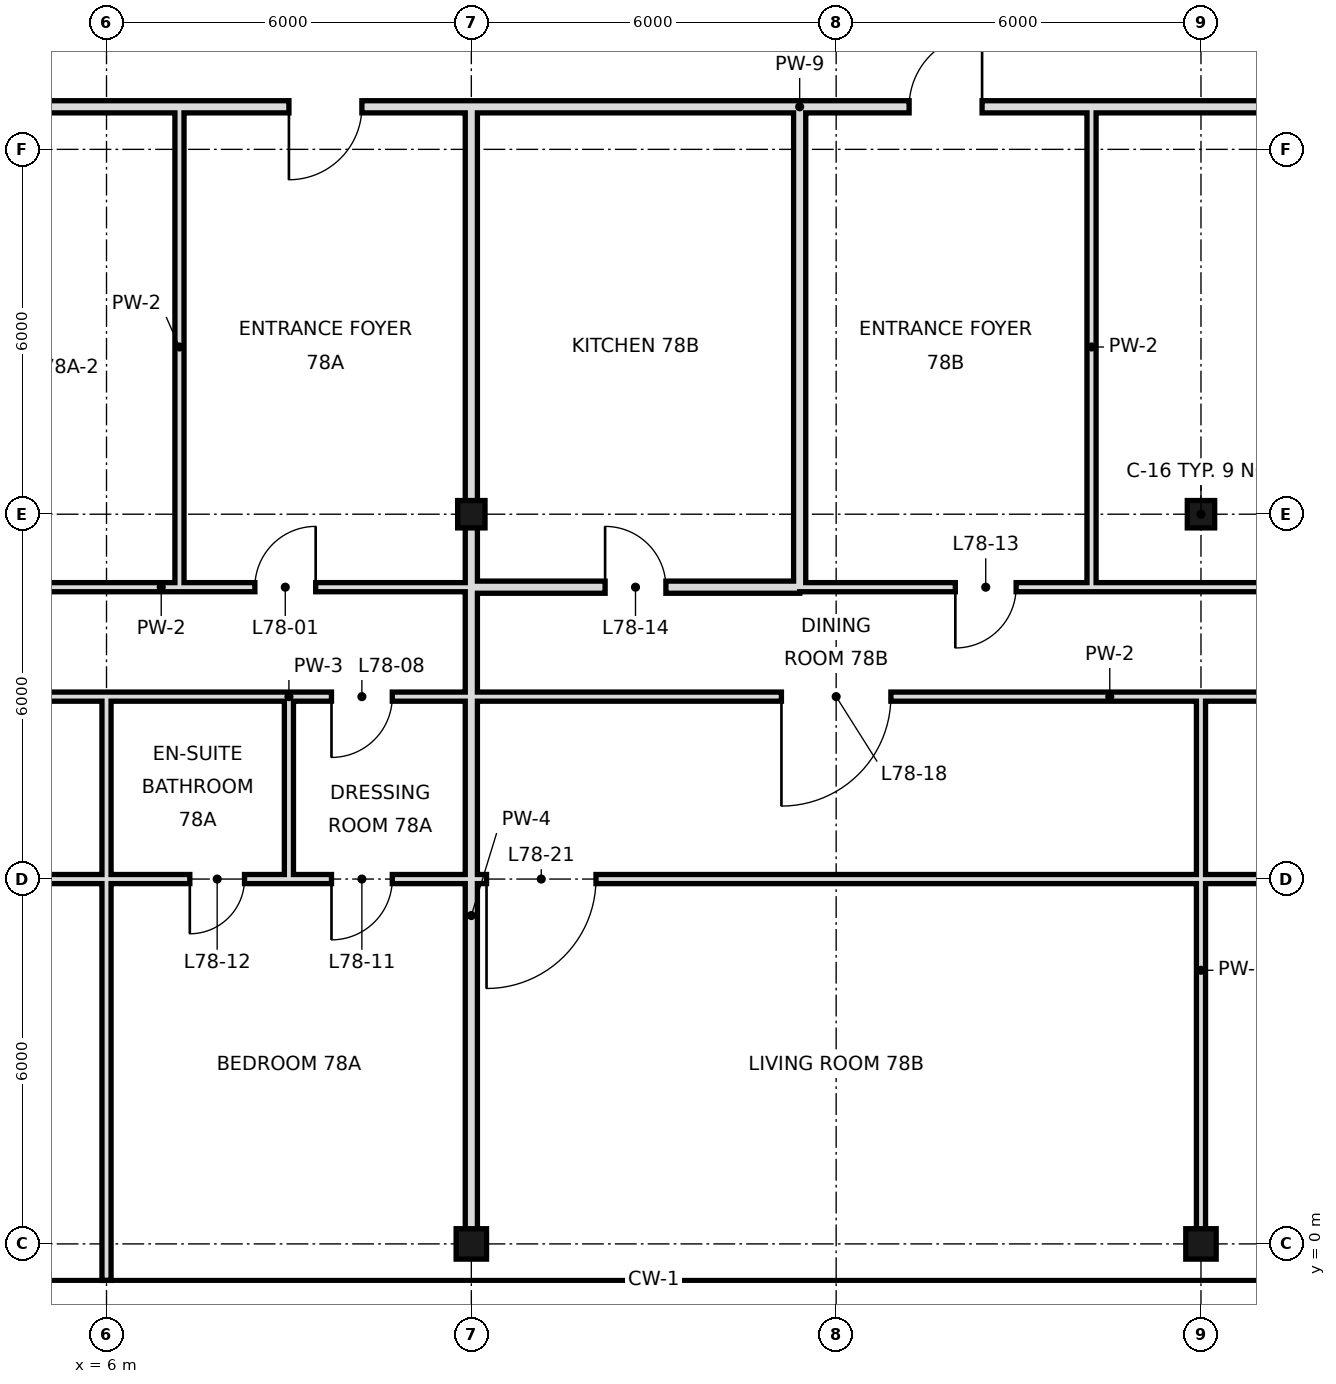
"""IFC4 building model, lengths in metres.
Left out: names, types, materials, properties, quantities, classifications, styles, units other than length and angle.
Written with IfcOpenShell. Run it as: python <this file> out.ifc"""

import sys

from ifc_helpers import new_model, si_unit, direction, frame, frame_2d, origin, origin_2d, place, context, subcontext, project, spatial, rectangle, hollow_rectangle, extrude, element, fill, save


model = new_model("IFC4")
c1 = context("Model", 3, precision=1e-05, world=origin(), true_north=direction((0.0, 1.0)))
c2 = subcontext(c1, "Body", "Model", "MODEL_VIEW")
j1 = project(units=[si_unit("LENGTHUNIT", "METRE"), si_unit("PLANEANGLEUNIT", "RADIAN")], contexts=[c1])
p1 = place(None, origin())
s1 = spatial("IfcSite", under=j1, at=p1, CompositionType="ELEMENT")
p2 = place(p1, origin())
s2 = spatial("IfcBuilding", under=s1, at=p2, CompositionType="ELEMENT")
p3 = place(p2, frame((0.0, 0.0, 326.8)))
s3 = spatial("IfcBuildingStorey", under=s2, at=p3, CompositionType="ELEMENT", Elevation=326.8)
p4 = place(p3, frame((12.0, 0.0, 0.0), z_axis=(0.0, 0.0, 1.0), x_axis=(1.0, 0.0, 0.0)))
e1 = element("IfcColumn", 1, at=p4, inside=s3, PredefinedType="COLUMN", context=c2, shape_type="SweptSolid", body=[
    extrude(hollow_rectangle(XDim=0.5, YDim=0.5, WallThickness=0.025, at=origin_2d()), origin(), (0.0, 0.0, 1.0), 4.4),
])
p5 = place(p3, frame((12.0, 12.0, 0.0), z_axis=(0.0, 0.0, 1.0), x_axis=(1.0, 0.0, 0.0)))
e2 = element("IfcColumn", 2, at=p5, inside=s3, PredefinedType="COLUMN", context=c2, shape_type="SweptSolid", body=[
    extrude(hollow_rectangle(XDim=0.45, YDim=0.45, WallThickness=0.022, at=origin_2d()), origin(), (0.0, 0.0, 1.0), 4.4),
])
p6 = place(p3, frame((24.0, 0.0, 0.0), z_axis=(0.0, 0.0, 1.0), x_axis=(1.0, 0.0, 0.0)))
e3 = element("IfcColumn", 3, at=p6, inside=s3, PredefinedType="COLUMN", context=c2, shape_type="SweptSolid", body=[
    extrude(hollow_rectangle(XDim=0.5, YDim=0.5, WallThickness=0.025, at=origin_2d()), origin(), (0.0, 0.0, 1.0), 4.4),
])
p7 = place(p3, frame((24.0, 12.0, 0.0), z_axis=(0.0, 0.0, 1.0), x_axis=(1.0, 0.0, 0.0)))
e4 = element("IfcColumn", 4, at=p7, inside=s3, PredefinedType="COLUMN", context=c2, shape_type="SweptSolid", body=[
    extrude(hollow_rectangle(XDim=0.45, YDim=0.45, WallThickness=0.022, at=origin_2d()), origin(), (0.0, 0.0, 1.0), 4.4),
])
p8 = place(p3, frame((12.0, 10.8, 0.0), z_axis=(0.0, 0.0, 1.0), x_axis=(0.0, 1.0, 0.0)))
e5 = element("IfcWall", 5, at=p8, inside=s3, PredefinedType="SOLIDWALL", context=c2, shape_type="SweptSolid", body=[
    extrude(rectangle(XDim=7.9, YDim=0.2, at=frame_2d((3.95, 0.0))), origin(), (0.0, 0.0, 1.0), 3.4),
])
p9 = place(p3, frame((12.0, 0.0, 0.0), z_axis=(0.0, 0.0, 1.0), x_axis=(0.0, 1.0, 0.0)))
e6 = element("IfcWall", 6, at=p9, inside=s3, PredefinedType="SOLIDWALL", context=c2, shape_type="SweptSolid", body=[
    extrude(rectangle(XDim=10.8, YDim=0.2, at=frame_2d((5.4, 0.0))), origin(), (0.0, 0.0, 1.0), 3.4),
])
p10 = place(p3, frame((17.4, 10.8, 0.0), z_axis=(0.0, 0.0, 1.0), x_axis=(0.0, 1.0, 0.0)))
e7 = element("IfcWall", 7, at=p10, inside=s3, PredefinedType="SOLIDWALL", context=c2, shape_type="SweptSolid", body=[
    extrude(rectangle(XDim=7.9, YDim=0.2, at=frame_2d((3.95, 0.0))), origin(), (0.0, 0.0, 1.0), 3.4),
])
p11 = place(p3, frame((22.2, 10.8, 0.0), z_axis=(0.0, 0.0, 1.0), x_axis=(0.0, 1.0, 0.0)))
e8 = element("IfcWall", 8, at=p11, inside=s3, PredefinedType="PARTITIONING", context=c2, shape_type="SweptSolid", body=[
    extrude(rectangle(XDim=7.9, YDim=0.15, at=frame_2d((3.95, 0.0))), origin(), (0.0, 0.0, 1.0), 4.1),
])
p12 = place(p3, frame((24.0, 0.0, 0.0), z_axis=(0.0, 0.0, 1.0), x_axis=(0.0, 1.0, 0.0)))
e9 = element("IfcWall", 9, at=p12, inside=s3, PredefinedType="PARTITIONING", context=c2, shape_type="SweptSolid", body=[
    extrude(rectangle(XDim=9.0, YDim=0.15, at=frame_2d((4.5, 0.0))), origin(), (0.0, 0.0, 1.0), 3.4),
])
p13 = place(p3, frame((6.0, -0.6, 0.0), z_axis=(0.0, 0.0, 1.0), x_axis=(0.0, 1.0, 0.0)))
e10 = element("IfcWall", 10, at=p13, inside=s3, PredefinedType="PARTITIONING", context=c2, shape_type="SweptSolid", body=[
    extrude(rectangle(XDim=6.6, YDim=0.15, at=frame_2d((3.3, 0.0))), origin(), (0.0, 0.0, 1.0), 3.4),
])
p14 = place(p3, frame((6.0, 6.0, 0.0), z_axis=(0.0, 0.0, 1.0), x_axis=(0.0, 1.0, 0.0)))
e11 = element("IfcWall", 11, at=p14, inside=s3, PredefinedType="PARTITIONING", context=c2, shape_type="SweptSolid", body=[
    extrude(rectangle(XDim=3.0, YDim=0.15, at=frame_2d((1.5, 0.0))), origin(), (0.0, 0.0, 1.0), 3.4),
])
p15 = place(p3, frame((7.2, 10.8, 0.0), z_axis=(0.0, 0.0, 1.0), x_axis=(0.0, 1.0, 0.0)))
e12 = element("IfcWall", 12, at=p15, inside=s3, PredefinedType="PARTITIONING", context=c2, shape_type="SweptSolid", body=[
    extrude(rectangle(XDim=7.9, YDim=0.15, at=frame_2d((3.95, 0.0))), origin(), (0.0, 0.0, 1.0), 4.1),
])
p16 = place(p3, frame((9.0, 6.0, 0.0), z_axis=(0.0, 0.0, 1.0), x_axis=(0.0, 1.0, 0.0)))
e13 = element("IfcWall", 13, at=p16, inside=s3, PredefinedType="PARTITIONING", context=c2, shape_type="SweptSolid", body=[
    extrude(rectangle(XDim=3.0, YDim=0.15, at=frame_2d((1.5, 0.0))), origin(), (0.0, 0.0, 1.0), 4.1),
])
p17 = place(p3, frame((12.0, 10.8, 0.0), z_axis=(0.0, 0.0, 1.0), x_axis=(1.0, 0.0, 0.0)))
e14 = element("IfcWall", 14, at=p17, inside=s3, PredefinedType="SOLIDWALL", context=c2, shape_type="SweptSolid", body=[
    extrude(rectangle(XDim=5.4, YDim=0.2, at=frame_2d((2.7, 0.0))), origin(), (0.0, 0.0, 1.0), 3.4),
])
p18 = place(p17, frame((2.2, 0.0, 0.0)))
e15 = element("IfcOpeningElement", 15, at=p18, cuts=e14, PredefinedType="OPENING", context=c2, shape_type="SweptSolid", body=[
    extrude(rectangle(XDim=1.0, YDim=2.4, at=frame_2d((0.5, 1.2))), frame((0.0, 0.11, 0.0), z_axis=(0.0, -1.0, 0.0), x_axis=(1.0, 0.0, 0.0)), (0.0, 0.0, 1.0), 0.22),
])
p19 = place(p3, frame((1.8, 10.8, 0.0), z_axis=(0.0, 0.0, 1.0), x_axis=(1.0, 0.0, 0.0)))
e16 = element("IfcWall", 16, at=p19, inside=s3, PredefinedType="PARTITIONING", context=c2, shape_type="SweptSolid", body=[
    extrude(rectangle(XDim=10.2, YDim=0.15, at=frame_2d((5.1, 0.0))), origin(), (0.0, 0.0, 1.0), 4.1),
])
p20 = place(p19, frame((6.64, 0.0, 0.0)))
e17 = element("IfcOpeningElement", 17, at=p20, cuts=e16, PredefinedType="OPENING", context=c2, shape_type="SweptSolid", body=[
    extrude(rectangle(XDim=1.0, YDim=2.4, at=frame_2d((0.5, 1.2))), frame((0.0, 0.085, 0.0), z_axis=(0.0, -1.0, 0.0), x_axis=(1.0, 0.0, 0.0)), (0.0, 0.0, 1.0), 0.17),
])
p21 = place(p19, frame((2.2, 0.0, 0.0)))
e18 = element("IfcOpeningElement", 18, at=p21, cuts=e16, PredefinedType="OPENING", context=c2, shape_type="SweptSolid", body=[
    extrude(rectangle(XDim=1.0, YDim=2.4, at=frame_2d((0.5, 1.2))), frame((0.0, 0.085, 0.0), z_axis=(0.0, -1.0, 0.0), x_axis=(1.0, 0.0, 0.0)), (0.0, 0.0, 1.0), 0.17),
])
p22 = place(p3, frame((17.4, 10.8, 0.0), z_axis=(0.0, 0.0, 1.0), x_axis=(1.0, 0.0, 0.0)))
e19 = element("IfcWall", 19, at=p22, inside=s3, PredefinedType="PARTITIONING", context=c2, shape_type="SweptSolid", body=[
    extrude(rectangle(XDim=16.2, YDim=0.15, at=frame_2d((8.1, 0.0))), origin(), (0.0, 0.0, 1.0), 4.1),
])
p23 = place(p22, frame((2.56, 0.0, 0.0)))
e20 = element("IfcOpeningElement", 20, at=p23, cuts=e19, PredefinedType="OPENING", context=c2, shape_type="SweptSolid", body=[
    extrude(rectangle(XDim=1.0, YDim=2.4, at=frame_2d((0.5, 1.2))), frame((0.0, 0.085, 0.0), z_axis=(0.0, -1.0, 0.0), x_axis=(1.0, 0.0, 0.0)), (0.0, 0.0, 1.0), 0.17),
])
p24 = place(p22, frame((10.0, 0.0, 0.0)))
e21 = element("IfcOpeningElement", 21, at=p24, cuts=e19, PredefinedType="OPENING", context=c2, shape_type="SweptSolid", body=[
    extrude(rectangle(XDim=1.0, YDim=2.4, at=frame_2d((0.5, 1.2))), frame((0.0, 0.085, 0.0), z_axis=(0.0, -1.0, 0.0), x_axis=(1.0, 0.0, 0.0)), (0.0, 0.0, 1.0), 0.17),
])
p25 = place(p3, frame((3.1, 18.7, 0.0), z_axis=(0.0, 0.0, 1.0), x_axis=(1.0, 0.0, 0.0)))
e22 = element("IfcWall", 22, at=p25, inside=s3, PredefinedType="SOLIDWALL", context=c2, shape_type="SweptSolid", body=[
    extrude(rectangle(XDim=8.9, YDim=0.2, at=frame_2d((4.45, 0.0))), origin(), (0.0, 0.0, 1.0), 3.4),
])
p26 = place(p25, frame((5.9, 0.0, 0.0)))
e23 = element("IfcOpeningElement", 23, at=p26, cuts=e22, PredefinedType="OPENING", context=c2, shape_type="SweptSolid", body=[
    extrude(rectangle(XDim=1.2, YDim=2.4, at=frame_2d((0.6, 1.2))), frame((0.0, 0.11, 0.0), z_axis=(0.0, -1.0, 0.0), x_axis=(1.0, 0.0, 0.0)), (0.0, 0.0, 1.0), 0.22),
])
p27 = place(p3, frame((17.4, 18.7, 0.0), z_axis=(0.0, 0.0, 1.0), x_axis=(1.0, 0.0, 0.0)))
e24 = element("IfcWall", 24, at=p27, inside=s3, PredefinedType="SOLIDWALL", context=c2, shape_type="SweptSolid", body=[
    extrude(rectangle(XDim=27.5, YDim=0.2, at=frame_2d((13.75, 0.0))), origin(), (0.0, 0.0, 1.0), 3.4),
])
p28 = place(p27, frame((1.8, 0.0, 0.0)))
e25 = element("IfcOpeningElement", 25, at=p28, cuts=e24, PredefinedType="OPENING", context=c2, shape_type="SweptSolid", body=[
    extrude(rectangle(XDim=1.2, YDim=2.4, at=frame_2d((0.6, 1.2))), frame((0.0, 0.11, 0.0), z_axis=(0.0, -1.0, 0.0), x_axis=(1.0, 0.0, 0.0)), (0.0, 0.0, 1.0), 0.22),
])
p29 = place(p3, frame((12.0, 18.7, 0.0), z_axis=(0.0, 0.0, 1.0), x_axis=(1.0, 0.0, 0.0)))
e26 = element("IfcWall", 26, at=p29, inside=s3, PredefinedType="SOLIDWALL", context=c2, shape_type="SweptSolid", body=[
    extrude(rectangle(XDim=5.4, YDim=0.2, at=frame_2d((2.7, 0.0))), origin(), (0.0, 0.0, 1.0), 4.1),
])
p30 = place(p3, frame((-18.0, 6.0, 0.0), z_axis=(0.0, 0.0, 1.0), x_axis=(1.0, 0.0, 0.0)))
e27 = element("IfcWall", 27, at=p30, inside=s3, PredefinedType="PARTITIONING", context=c2, shape_type="SweptSolid", body=[
    extrude(rectangle(XDim=24.0, YDim=0.15, at=frame_2d((12.0, 0.0))), origin(), (0.0, 0.0, 1.0), 3.4),
])
p31 = place(p30, frame((10.75, 0.0, 0.0)))
e28 = element("IfcOpeningElement", 28, at=p31, cuts=e27, PredefinedType="OPENING", context=c2, shape_type="SweptSolid", body=[
    extrude(rectangle(XDim=1.0, YDim=2.4, at=frame_2d((0.5, 1.2))), frame((0.0, 0.085, 0.0), z_axis=(0.0, -1.0, 0.0), x_axis=(1.0, 0.0, 0.0)), (0.0, 0.0, 1.0), 0.17),
])
p32 = place(p30, frame((15.16, 0.0, 0.0)))
e29 = element("IfcOpeningElement", 29, at=p32, cuts=e27, PredefinedType="OPENING", context=c2, shape_type="SweptSolid", body=[
    extrude(rectangle(XDim=1.8, YDim=2.4, at=frame_2d((0.9, 1.2))), frame((0.0, 0.085, 0.0), z_axis=(0.0, -1.0, 0.0), x_axis=(1.0, 0.0, 0.0)), (0.0, 0.0, 1.0), 0.17),
])
p33 = place(p3, frame((9.0, 6.0, 0.0), z_axis=(0.0, 0.0, 1.0), x_axis=(1.0, 0.0, 0.0)))
e30 = element("IfcWall", 30, at=p33, inside=s3, PredefinedType="PARTITIONING", context=c2, shape_type="SweptSolid", body=[
    extrude(rectangle(XDim=27.0, YDim=0.15, at=frame_2d((13.5, 0.0))), origin(), (0.0, 0.0, 1.0), 3.65),
])
p34 = place(p33, frame((0.7, 0.0, 0.0)))
e31 = element("IfcOpeningElement", 31, at=p34, cuts=e30, PredefinedType="OPENING", context=c2, shape_type="SweptSolid", body=[
    extrude(rectangle(XDim=1.0, YDim=2.4, at=frame_2d((0.5, 1.2))), frame((0.0, 0.085, 0.0), z_axis=(0.0, -1.0, 0.0), x_axis=(1.0, 0.0, 0.0)), (0.0, 0.0, 1.0), 0.17),
])
p35 = place(p33, frame((3.25, 0.0, 0.0)))
e32 = element("IfcOpeningElement", 32, at=p35, cuts=e30, PredefinedType="OPENING", context=c2, shape_type="SweptSolid", body=[
    extrude(rectangle(XDim=1.8, YDim=2.4, at=frame_2d((0.9, 1.2))), frame((0.0, 0.085, 0.0), z_axis=(0.0, -1.0, 0.0), x_axis=(1.0, 0.0, 0.0)), (0.0, 0.0, 1.0), 0.17),
])
p36 = place(p33, frame((25.75, 0.0, 0.0)))
e33 = element("IfcOpeningElement", 33, at=p36, cuts=e30, PredefinedType="OPENING", context=c2, shape_type="SweptSolid", body=[
    extrude(rectangle(XDim=1.0, YDim=2.4, at=frame_2d((0.5, 1.2))), frame((0.0, 0.085, 0.0), z_axis=(0.0, -1.0, 0.0), x_axis=(1.0, 0.0, 0.0)), (0.0, 0.0, 1.0), 0.17),
])
p37 = place(p3, frame((6.0, 6.0, 0.0), z_axis=(0.0, 0.0, 1.0), x_axis=(1.0, 0.0, 0.0)))
e34 = element("IfcWall", 34, at=p37, inside=s3, PredefinedType="PARTITIONING", context=c2, shape_type="SweptSolid", body=[
    extrude(rectangle(XDim=3.0, YDim=0.15, at=frame_2d((1.5, 0.0))), origin(), (0.0, 0.0, 1.0), 3.65),
])
p38 = place(p37, frame((1.37, 0.0, 0.0)))
e35 = element("IfcOpeningElement", 35, at=p38, cuts=e34, PredefinedType="OPENING", context=c2, shape_type="SweptSolid", body=[
    extrude(rectangle(XDim=0.9, YDim=2.4, at=frame_2d((0.45, 1.2))), frame((0.0, 0.085, 0.0), z_axis=(0.0, -1.0, 0.0), x_axis=(1.0, 0.0, 0.0)), (0.0, 0.0, 1.0), 0.17),
])
p39 = place(p3, frame((-18.6, 9.0, 0.0), z_axis=(0.0, 0.0, 1.0), x_axis=(1.0, 0.0, 0.0)))
e36 = element("IfcWall", 36, at=p39, inside=s3, PredefinedType="PARTITIONING", context=c2, shape_type="SweptSolid", body=[
    extrude(rectangle(XDim=24.6, YDim=0.15, at=frame_2d((12.3, 0.0))), origin(), (0.0, 0.0, 1.0), 4.1),
])
p40 = place(p39, frame((11.35, 0.0, 0.0)))
e37 = element("IfcOpeningElement", 37, at=p40, cuts=e36, PredefinedType="OPENING", context=c2, shape_type="SweptSolid", body=[
    extrude(rectangle(XDim=1.0, YDim=2.4, at=frame_2d((0.5, 1.2))), frame((0.0, 0.085, 0.0), z_axis=(0.0, -1.0, 0.0), x_axis=(1.0, 0.0, 0.0)), (0.0, 0.0, 1.0), 0.17),
])
p41 = place(p39, frame((19.64, 0.0, 0.0)))
e38 = element("IfcOpeningElement", 38, at=p41, cuts=e36, PredefinedType="OPENING", context=c2, shape_type="SweptSolid", body=[
    extrude(rectangle(XDim=1.8, YDim=2.4, at=frame_2d((0.9, 1.2))), frame((0.0, 0.085, 0.0), z_axis=(0.0, -1.0, 0.0), x_axis=(1.0, 0.0, 0.0)), (0.0, 0.0, 1.0), 0.17),
])
p42 = place(p3, frame((9.0, 9.0, 0.0), z_axis=(0.0, 0.0, 1.0), x_axis=(1.0, 0.0, 0.0)))
e39 = element("IfcWall", 39, at=p42, inside=s3, PredefinedType="PARTITIONING", context=c2, shape_type="SweptSolid", body=[
    extrude(rectangle(XDim=27.0, YDim=0.15, at=frame_2d((13.5, 0.0))), origin(), (0.0, 0.0, 1.0), 4.1),
])
p43 = place(p42, frame((0.7, 0.0, 0.0)))
e40 = element("IfcOpeningElement", 40, at=p43, cuts=e39, PredefinedType="OPENING", context=c2, shape_type="SweptSolid", body=[
    extrude(rectangle(XDim=1.0, YDim=2.4, at=frame_2d((0.5, 1.2))), frame((0.0, 0.085, 0.0), z_axis=(0.0, -1.0, 0.0), x_axis=(1.0, 0.0, 0.0)), (0.0, 0.0, 1.0), 0.17),
])
p44 = place(p42, frame((8.1, 0.0, 0.0)))
e41 = element("IfcOpeningElement", 41, at=p44, cuts=e39, PredefinedType="OPENING", context=c2, shape_type="SweptSolid", body=[
    extrude(rectangle(XDim=1.8, YDim=2.4, at=frame_2d((0.9, 1.2))), frame((0.0, 0.085, 0.0), z_axis=(0.0, -1.0, 0.0), x_axis=(1.0, 0.0, 0.0)), (0.0, 0.0, 1.0), 0.17),
])
p45 = place(p42, frame((20.5, 0.0, 0.0)))
e42 = element("IfcOpeningElement", 42, at=p45, cuts=e39, PredefinedType="OPENING", context=c2, shape_type="SweptSolid", body=[
    extrude(rectangle(XDim=1.0, YDim=2.4, at=frame_2d((0.5, 1.2))), frame((0.0, 0.085, 0.0), z_axis=(0.0, -1.0, 0.0), x_axis=(1.0, 0.0, 0.0)), (0.0, 0.0, 1.0), 0.17),
])
p46 = place(p3, frame((6.0, 9.0, 0.0), z_axis=(0.0, 0.0, 1.0), x_axis=(1.0, 0.0, 0.0)))
e43 = element("IfcWall", 43, at=p46, inside=s3, PredefinedType="PARTITIONING", context=c2, shape_type="SweptSolid", body=[
    extrude(rectangle(XDim=3.0, YDim=0.15, at=frame_2d((1.5, 0.0))), origin(), (0.0, 0.0, 1.0), 4.1),
])
p47 = place(p20, frame((1.0, 0.0, 0.0), z_axis=(0.0, 0.0, 1.0), x_axis=(-1.0, 0.0, 0.0)))
e44 = element("IfcDoor", 44, at=p47, inside=s3, OperationType="SINGLE_SWING_LEFT", PredefinedType="DOOR", context=c2, shape_type="SweptSolid", body=[
    extrude(rectangle(XDim=1.0, YDim=2.4, at=frame_2d((0.5, 1.2))), frame((0.0, 0.025, 0.0), z_axis=(0.0, -1.0, 0.0), x_axis=(1.0, 0.0, 0.0)), (0.0, 0.0, 1.0), 0.05),
])
fill(e17, e44)
p48 = place(p43, frame((1.0, 0.0, 0.0), z_axis=(0.0, 0.0, 1.0), x_axis=(-1.0, 0.0, 0.0)))
e45 = element("IfcDoor", 45, at=p48, inside=s3, OperationType="SINGLE_SWING_RIGHT", PredefinedType="DOOR", context=c2, shape_type="SweptSolid", body=[
    extrude(rectangle(XDim=1.0, YDim=2.4, at=frame_2d((0.5, 1.2))), frame((0.0, 0.025, 0.0), z_axis=(0.0, -1.0, 0.0), x_axis=(1.0, 0.0, 0.0)), (0.0, 0.0, 1.0), 0.05),
])
fill(e40, e45)
p49 = place(p34, frame((1.0, 0.0, 0.0), z_axis=(0.0, 0.0, 1.0), x_axis=(-1.0, 0.0, 0.0)))
e46 = element("IfcDoor", 46, at=p49, inside=s3, OperationType="SINGLE_SWING_RIGHT", PredefinedType="DOOR", context=c2, shape_type="SweptSolid", body=[
    extrude(rectangle(XDim=1.0, YDim=2.4, at=frame_2d((0.5, 1.2))), frame((0.0, 0.025, 0.0), z_axis=(0.0, -1.0, 0.0), x_axis=(1.0, 0.0, 0.0)), (0.0, 0.0, 1.0), 0.05),
])
fill(e31, e46)
p50 = place(p38, frame((0.9, 0.0, 0.0), z_axis=(0.0, 0.0, 1.0), x_axis=(-1.0, 0.0, 0.0)))
e47 = element("IfcDoor", 47, at=p50, inside=s3, OperationType="SINGLE_SWING_RIGHT", PredefinedType="DOOR", context=c2, shape_type="SweptSolid", body=[
    extrude(rectangle(XDim=0.9, YDim=2.4, at=frame_2d((0.45, 1.2))), frame((0.0, 0.025, 0.0), z_axis=(0.0, -1.0, 0.0), x_axis=(1.0, 0.0, 0.0)), (0.0, 0.0, 1.0), 0.05),
])
fill(e35, e47)
p51 = place(p23, frame((1.0, 0.0, 0.0), z_axis=(0.0, 0.0, 1.0), x_axis=(-1.0, 0.0, 0.0)))
e48 = element("IfcDoor", 48, at=p51, inside=s3, OperationType="SINGLE_SWING_RIGHT", PredefinedType="DOOR", context=c2, shape_type="SweptSolid", body=[
    extrude(rectangle(XDim=1.0, YDim=2.4, at=frame_2d((0.5, 1.2))), frame((0.0, 0.025, 0.0), z_axis=(0.0, -1.0, 0.0), x_axis=(1.0, 0.0, 0.0)), (0.0, 0.0, 1.0), 0.05),
])
fill(e20, e48)
p52 = place(p18, origin())
e49 = element("IfcDoor", 49, at=p52, inside=s3, OperationType="SINGLE_SWING_LEFT", PredefinedType="DOOR", context=c2, shape_type="SweptSolid", body=[
    extrude(rectangle(XDim=1.0, YDim=2.4, at=frame_2d((0.5, 1.2))), frame((0.0, 0.025, 0.0), z_axis=(0.0, -1.0, 0.0), x_axis=(1.0, 0.0, 0.0)), (0.0, 0.0, 1.0), 0.05),
])
fill(e15, e49)
p53 = place(p44, frame((1.8, 0.0, 0.0), z_axis=(0.0, 0.0, 1.0), x_axis=(-1.0, 0.0, 0.0)))
e50 = element("IfcDoor", 50, at=p53, inside=s3, OperationType="SINGLE_SWING_RIGHT", PredefinedType="DOOR", context=c2, shape_type="SweptSolid", body=[
    extrude(rectangle(XDim=1.8, YDim=2.4, at=frame_2d((0.9, 1.2))), frame((0.0, 0.025, 0.0), z_axis=(0.0, -1.0, 0.0), x_axis=(1.0, 0.0, 0.0)), (0.0, 0.0, 1.0), 0.05),
])
fill(e41, e50)
p54 = place(p35, frame((1.8, 0.0, 0.0), z_axis=(0.0, 0.0, 1.0), x_axis=(-1.0, 0.0, 0.0)))
e51 = element("IfcDoor", 51, at=p54, inside=s3, OperationType="SINGLE_SWING_RIGHT", PredefinedType="DOOR", context=c2, shape_type="SweptSolid", body=[
    extrude(rectangle(XDim=1.8, YDim=2.4, at=frame_2d((0.9, 1.2))), frame((0.0, 0.025, 0.0), z_axis=(0.0, -1.0, 0.0), x_axis=(1.0, 0.0, 0.0)), (0.0, 0.0, 1.0), 0.05),
])
fill(e32, e51)
p55 = place(p26, frame((1.2, 0.0, 0.0), z_axis=(0.0, 0.0, 1.0), x_axis=(-1.0, 0.0, 0.0)))
e52 = element("IfcDoor", 52, at=p55, inside=s3, OperationType="SINGLE_SWING_RIGHT", PredefinedType="DOOR", context=c2, shape_type="SweptSolid", body=[
    extrude(rectangle(XDim=1.2, YDim=2.4, at=frame_2d((0.6, 1.2))), frame((0.0, 0.025, 0.0), z_axis=(0.0, -1.0, 0.0), x_axis=(1.0, 0.0, 0.0)), (0.0, 0.0, 1.0), 0.05),
])
fill(e23, e52)
p56 = place(p28, frame((1.2, 0.0, 0.0), z_axis=(0.0, 0.0, 1.0), x_axis=(-1.0, 0.0, 0.0)))
e53 = element("IfcDoor", 53, at=p56, inside=s3, OperationType="SINGLE_SWING_LEFT", PredefinedType="DOOR", context=c2, shape_type="SweptSolid", body=[
    extrude(rectangle(XDim=1.2, YDim=2.4, at=frame_2d((0.6, 1.2))), frame((0.0, 0.025, 0.0), z_axis=(0.0, -1.0, 0.0), x_axis=(1.0, 0.0, 0.0)), (0.0, 0.0, 1.0), 0.05),
])
fill(e25, e53)
save(model, sys.argv[1])
